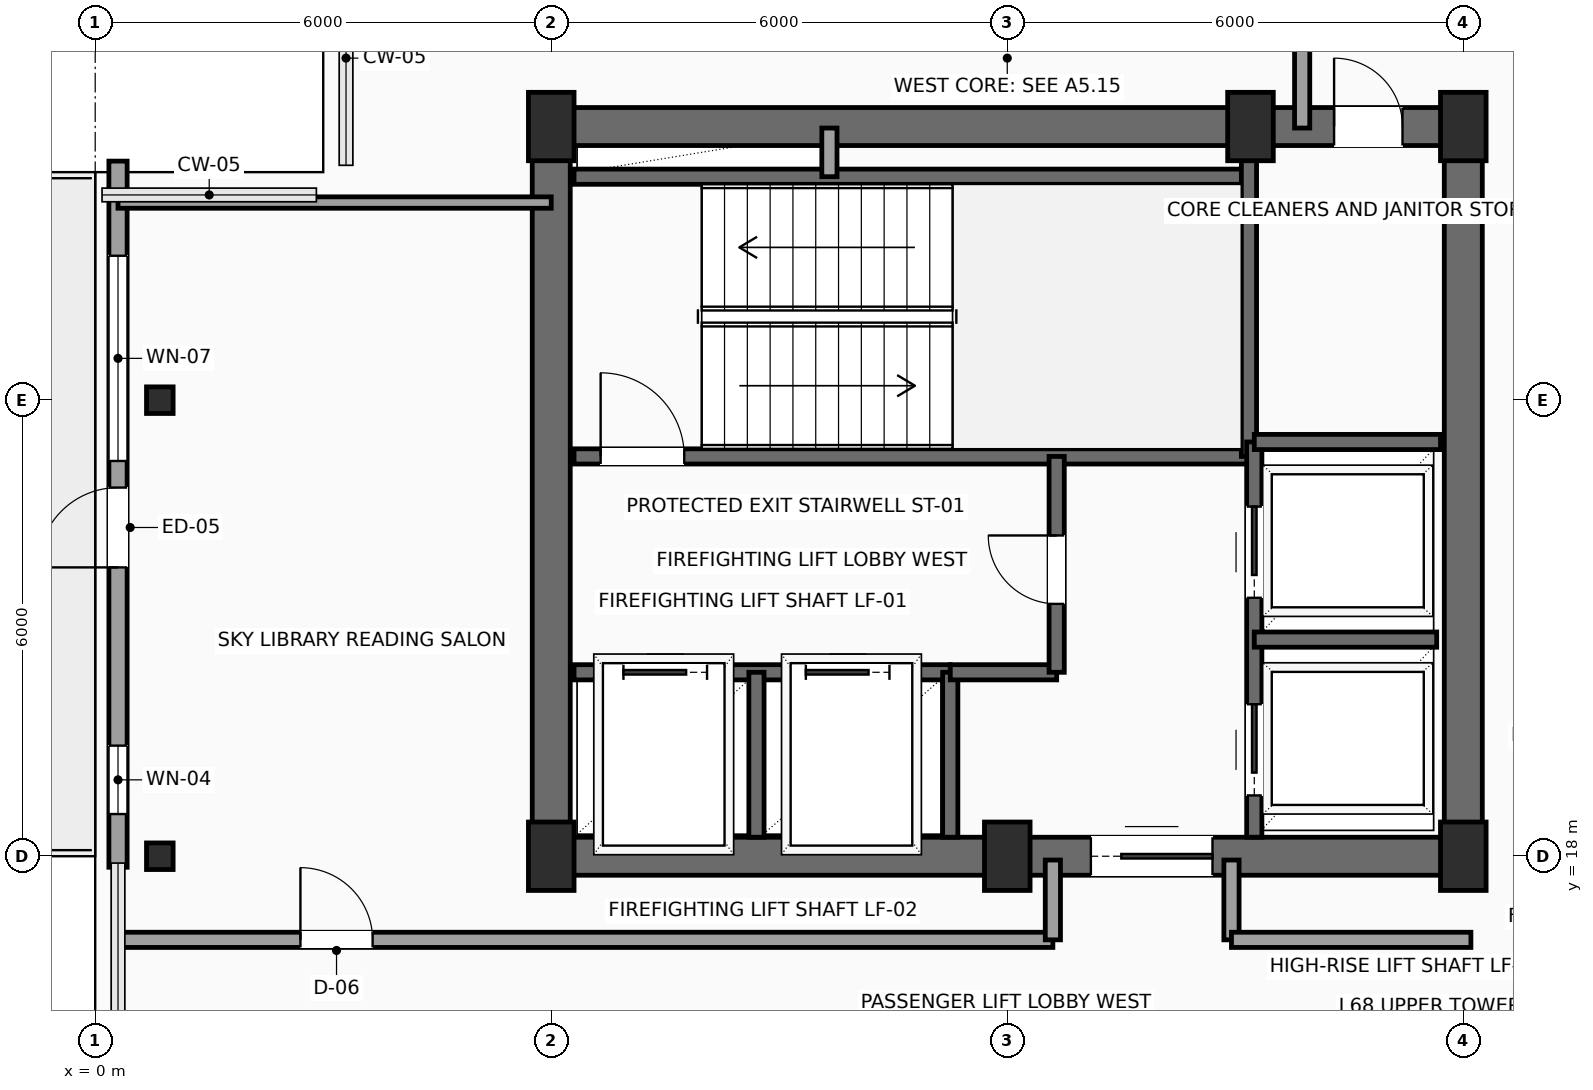
"""IFC4 building model, lengths in metres.
Left out: names, types, materials, properties, quantities, classifications, styles, units other than length and angle.
Written with IfcOpenShell. Run it as: python <this file> out.ifc"""

import sys

from ifc_helpers import new_model, si_unit, direction, frame, frame_2d, origin, origin_2d, place, context, subcontext, project, spatial, rectangle, hollow_rectangle, extrude, element, fill, save


model = new_model("IFC4")
c1 = context("Model", 3, precision=1e-05, world=origin(), true_north=direction((0.0, 1.0)))
c2 = subcontext(c1, "Body", "Model", "MODEL_VIEW")
j1 = project(units=[si_unit("LENGTHUNIT", "METRE"), si_unit("PLANEANGLEUNIT", "RADIAN")], contexts=[c1])
p1 = place(None, origin())
s1 = spatial("IfcSite", under=j1, at=p1, CompositionType="ELEMENT")
p2 = place(p1, origin())
s2 = spatial("IfcBuilding", under=s1, at=p2, CompositionType="ELEMENT")
p3 = place(p2, frame((0.0, 0.0, 271.2)))
s3 = spatial("IfcBuildingStorey", under=s2, at=p3, CompositionType="ELEMENT", Elevation=271.2)
for number, where, z_axis, x_axis in (
    (1, (6.0, 18.0, 0.0), (0.0, 0.0, 1.0), (1.0, 0.0, 0.0)),
    (2, (12.0, 18.0, 0.0), (0.0, 0.0, 1.0), (1.0, 0.0, 0.0)),
    (3, (18.0, 18.0, 0.0), (0.0, 0.0, 1.0), (1.0, 0.0, 0.0)),
    (4, (6.0, 27.6, 0.0), (0.0, 0.0, 1.0), (1.0, 0.0, 0.0)),
    (5, (15.2, 27.6, 0.0), (0.0, 0.0, 1.0), (1.0, 0.0, 0.0)),
    (6, (18.0, 27.6, 0.0), (0.0, 0.0, 1.0), (1.0, 0.0, 0.0)),
):
    element("IfcColumn", number, at=place(p3, frame(where, z_axis=z_axis, x_axis=x_axis)), inside=s3, PredefinedType="COLUMN", context=c2, shape_type="SweptSolid", body=[
        extrude(rectangle(XDim=0.6, YDim=0.9, at=origin_2d()), origin(), (0.0, 0.0, 1.0), 3.5),
    ])
for number, where, z_axis, x_axis in (
    (7, (0.85, 18.0, 0.0), (0.0, 0.0, 1.0), (1.0, 0.0, 0.0)),
    (8, (0.85, 24.0, 0.0), (0.0, 0.0, 1.0), (1.0, 0.0, 0.0)),
):
    element("IfcColumn", number, at=place(p3, frame(where, z_axis=z_axis, x_axis=x_axis)), inside=s3, PredefinedType="COLUMN", context=c2, shape_type="SweptSolid", body=[
        extrude(hollow_rectangle(XDim=0.35, YDim=0.35, WallThickness=0.016, InnerFilletRadius=0.016, OuterFilletRadius=0.032, at=origin_2d()), origin(), (0.0, 0.0, 1.0), 3.5),
    ])
p4 = place(p3, frame((0.3, 17.855, 0.0), z_axis=(0.0, 0.0, 1.0), x_axis=(0.0, 1.0, 0.0)))
e9 = element("IfcWall", 9, at=p4, inside=s3, PredefinedType="SOLIDWALL", context=c2, shape_type="SweptSolid", body=[
    extrude(rectangle(XDim=9.29, YDim=0.24, at=frame_2d((4.645, 0.0))), origin(), (0.0, 0.0, 1.0), 3.3),
])
p5 = place(p4, frame((3.945, 0.0, 0.0)))
e10 = element("IfcOpeningElement", 10, at=p5, cuts=e9, PredefinedType="OPENING", context=c2, shape_type="SweptSolid", body=[
    extrude(rectangle(XDim=1.05, YDim=2.2, at=frame_2d((0.525, 1.1))), frame((0.0, 0.13, 0.0), z_axis=(0.0, -1.0, 0.0), x_axis=(1.0, 0.0, 0.0)), (0.0, 0.0, 1.0), 0.26),
])
p6 = place(p4, frame((5.345, 0.0, 0.6)))
e11 = element("IfcOpeningElement", 11, at=p6, cuts=e9, PredefinedType="OPENING", context=c2, shape_type="SweptSolid", body=[
    extrude(rectangle(XDim=2.7, YDim=2.3, at=frame_2d((1.35, 1.15))), frame((0.0, 0.13, 0.0), z_axis=(0.0, -1.0, 0.0), x_axis=(1.0, 0.0, 0.0)), (0.0, 0.0, 1.0), 0.26),
])
p7 = place(p4, frame((0.7, 0.0, 0.6)))
e12 = element("IfcOpeningElement", 12, at=p7, cuts=e9, PredefinedType="OPENING", context=c2, shape_type="SweptSolid", body=[
    extrude(rectangle(XDim=0.9, YDim=2.2, at=frame_2d((0.45, 1.1))), frame((0.0, 0.13, 0.0), z_axis=(0.0, -1.0, 0.0), x_axis=(1.0, 0.0, 0.0)), (0.0, 0.0, 1.0), 0.26),
])
p8 = place(p3, frame((6.0, 18.0, 0.0), z_axis=(0.0, 0.0, 1.0), x_axis=(1.0, 0.0, 0.0)))
e13 = element("IfcWall", 13, at=p8, inside=s3, PredefinedType="SHEAR", context=c2, shape_type="SweptSolid", body=[
    extrude(rectangle(XDim=12.0, YDim=0.5, at=frame_2d((6.0, 0.0))), origin(), (0.0, 0.0, 1.0), 3.3),
])
p9 = place(p8, frame((7.1, 0.0, 0.0)))
e14 = element("IfcOpeningElement", 14, at=p9, cuts=e13, PredefinedType="OPENING", context=c2, shape_type="SweptSolid", body=[
    extrude(rectangle(XDim=1.6, YDim=2.3, at=frame_2d((0.8, 1.15))), frame((0.0, 0.26, 0.0), z_axis=(0.0, -1.0, 0.0), x_axis=(1.0, 0.0, 0.0)), (0.0, 0.0, 1.0), 0.52),
])
p10 = place(p3, frame((6.0, 27.6, 0.0), z_axis=(0.0, 0.0, 1.0), x_axis=(1.0, 0.0, 0.0)))
e15 = element("IfcWall", 15, at=p10, inside=s3, PredefinedType="SHEAR", context=c2, shape_type="SweptSolid", body=[
    extrude(rectangle(XDim=12.0, YDim=0.5, at=frame_2d((6.0, 0.0))), origin(), (0.0, 0.0, 1.0), 3.3),
])
p11 = place(p10, frame((10.3, 0.0, 0.0)))
e16 = element("IfcOpeningElement", 16, at=p11, cuts=e15, PredefinedType="OPENING", context=c2, shape_type="SweptSolid", body=[
    extrude(rectangle(XDim=0.9, YDim=2.15, at=frame_2d((0.45, 1.075))), frame((0.0, 0.26, 0.0), z_axis=(0.0, -1.0, 0.0), x_axis=(1.0, 0.0, 0.0)), (0.0, 0.0, 1.0), 0.52),
])
for number, where, z_axis, x_axis in (
    (17, (6.0, 18.0, 0.0), (0.0, 0.0, 1.0), (0.0, 1.0, 0.0)),
    (18, (18.0, 18.0, 0.0), (0.0, 0.0, 1.0), (0.0, 1.0, 0.0)),
):
    element("IfcWall", number, at=place(p3, frame(where, z_axis=z_axis, x_axis=x_axis)), inside=s3, PredefinedType="SHEAR", context=c2, shape_type="SweptSolid", body=[
        extrude(rectangle(XDim=9.6, YDim=0.5, at=frame_2d((4.8, 0.0))), origin(), (0.0, 0.0, 1.0), 3.3),
    ])
p12 = place(p3, frame((6.3, 23.26, 0.0), z_axis=(0.0, 0.0, 1.0), x_axis=(1.0, 0.0, 0.0)))
e19 = element("IfcWall", 19, at=p12, inside=s3, PredefinedType="SHEAR", context=c2, shape_type="SweptSolid", body=[
    extrude(rectangle(XDim=8.88, YDim=0.2, at=frame_2d((4.44, 0.0))), origin(), (0.0, 0.0, 1.0), 3.3),
])
p13 = place(p12, frame((0.35, 0.0, 0.0)))
e20 = element("IfcOpeningElement", 20, at=p13, cuts=e19, PredefinedType="OPENING", context=c2, shape_type="SweptSolid", body=[
    extrude(rectangle(XDim=1.1, YDim=2.2, at=frame_2d((0.55, 1.1))), frame((0.0, 0.11, 0.0), z_axis=(0.0, -1.0, 0.0), x_axis=(1.0, 0.0, 0.0)), (0.0, 0.0, 1.0), 0.22),
])
p14 = place(p3, frame((6.3, 26.94, 0.0), z_axis=(0.0, 0.0, 1.0), x_axis=(1.0, 0.0, 0.0)))
e21 = element("IfcWall", 21, at=p14, inside=s3, PredefinedType="SHEAR", context=c2, shape_type="SweptSolid", body=[
    extrude(rectangle(XDim=8.88, YDim=0.2, at=frame_2d((4.44, 0.0))), origin(), (0.0, 0.0, 1.0), 3.3),
])
p15 = place(p3, frame((15.18, 23.26, 0.0), z_axis=(0.0, 0.0, 1.0), x_axis=(0.0, 1.0, 0.0)))
e22 = element("IfcWall", 22, at=p15, inside=s3, PredefinedType="SHEAR", context=c2, shape_type="SweptSolid", body=[
    extrude(rectangle(XDim=4.04, YDim=0.2, at=frame_2d((2.02, 0.0))), origin(), (0.0, 0.0, 1.0), 3.3),
])
p16 = place(p3, frame((6.3, 20.42, 0.0), z_axis=(0.0, 0.0, 1.0), x_axis=(1.0, 0.0, 0.0)))
e23 = element("IfcWall", 23, at=p16, inside=s3, PredefinedType="SHEAR", context=c2, shape_type="SweptSolid", body=[
    extrude(rectangle(XDim=4.95, YDim=0.2, at=frame_2d((2.475, 0.0))), origin(), (0.0, 0.0, 1.0), 3.3),
])
p17 = place(p16, frame((0.65, 0.0, 0.0)))
e24 = element("IfcOpeningElement", 24, at=p17, cuts=e23, PredefinedType="OPENING", context=c2, shape_type="SweptSolid", body=[
    extrude(rectangle(XDim=1.1, YDim=2.2, at=frame_2d((0.55, 1.1))), frame((0.0, 0.11, 0.0), z_axis=(0.0, -1.0, 0.0), x_axis=(1.0, 0.0, 0.0)), (0.0, 0.0, 1.0), 0.22),
])
p18 = place(p16, frame((3.05, 0.0, 0.0)))
e25 = element("IfcOpeningElement", 25, at=p18, cuts=e23, PredefinedType="OPENING", context=c2, shape_type="SweptSolid", body=[
    extrude(rectangle(XDim=1.1, YDim=2.2, at=frame_2d((0.55, 1.1))), frame((0.0, 0.11, 0.0), z_axis=(0.0, -1.0, 0.0), x_axis=(1.0, 0.0, 0.0)), (0.0, 0.0, 1.0), 0.22),
])
for number, where, z_axis, x_axis in (
    (26, (8.7, 18.25, 0.0), (0.0, 0.0, 1.0), (0.0, 1.0, 0.0)),
    (27, (11.25, 18.25, 0.0), (0.0, 0.0, 1.0), (0.0, 1.0, 0.0)),
):
    element("IfcWall", number, at=place(p3, frame(where, z_axis=z_axis, x_axis=x_axis)), inside=s3, PredefinedType="SHEAR", context=c2, shape_type="SweptSolid", body=[
        extrude(rectangle(XDim=2.17, YDim=0.2, at=frame_2d((1.085, 0.0))), origin(), (0.0, 0.0, 1.0), 3.3),
    ])
p19 = place(p3, frame((11.25, 20.42, 0.0), z_axis=(0.0, 0.0, 1.0), x_axis=(1.0, 0.0, 0.0)))
e28 = element("IfcWall", 28, at=p19, inside=s3, PredefinedType="SHEAR", context=c2, shape_type="SweptSolid", body=[
    extrude(rectangle(XDim=1.4, YDim=0.2, at=frame_2d((0.7, 0.0))), origin(), (0.0, 0.0, 1.0), 3.3),
])
p20 = place(p3, frame((12.65, 20.42, 0.0), z_axis=(0.0, 0.0, 1.0), x_axis=(0.0, 1.0, 0.0)))
e29 = element("IfcWall", 29, at=p20, inside=s3, PredefinedType="SHEAR", context=c2, shape_type="SweptSolid", body=[
    extrude(rectangle(XDim=2.84, YDim=0.2, at=frame_2d((1.42, 0.0))), origin(), (0.0, 0.0, 1.0), 3.3),
])
p21 = place(p20, frame((0.9, 0.0, 0.0)))
e30 = element("IfcOpeningElement", 30, at=p21, cuts=e29, PredefinedType="OPENING", context=c2, shape_type="SweptSolid", body=[
    extrude(rectangle(XDim=0.9, YDim=2.15, at=frame_2d((0.45, 1.075))), frame((0.0, 0.11, 0.0), z_axis=(0.0, -1.0, 0.0), x_axis=(1.0, 0.0, 0.0)), (0.0, 0.0, 1.0), 0.22),
])
p22 = place(p3, frame((9.66, 26.94, 0.0), z_axis=(0.0, 0.0, 1.0), x_axis=(0.0, 1.0, 0.0)))
e31 = element("IfcWall", 31, at=p22, inside=s3, PredefinedType="SOLIDWALL", context=c2, shape_type="SweptSolid", body=[
    extrude(rectangle(XDim=0.64, YDim=0.2, at=frame_2d((0.32, 0.0))), origin(), (0.0, 0.0, 1.0), 3.3),
])
p23 = place(p3, frame((15.25, 18.25, 0.0), z_axis=(0.0, 0.0, 1.0), x_axis=(0.0, 1.0, 0.0)))
e32 = element("IfcWall", 32, at=p23, inside=s3, PredefinedType="SHEAR", context=c2, shape_type="SweptSolid", body=[
    extrude(rectangle(XDim=5.2, YDim=0.2, at=frame_2d((2.6, 0.0))), origin(), (0.0, 0.0, 1.0), 3.3),
])
p24 = place(p23, frame((0.55, 0.0, 0.0)))
e33 = element("IfcOpeningElement", 33, at=p24, cuts=e32, PredefinedType="OPENING", context=c2, shape_type="SweptSolid", body=[
    extrude(rectangle(XDim=1.2, YDim=2.2, at=frame_2d((0.6, 1.1))), frame((0.0, 0.11, 0.0), z_axis=(0.0, -1.0, 0.0), x_axis=(1.0, 0.0, 0.0)), (0.0, 0.0, 1.0), 0.22),
])
p25 = place(p23, frame((3.15, 0.0, 0.0)))
e34 = element("IfcOpeningElement", 34, at=p25, cuts=e32, PredefinedType="OPENING", context=c2, shape_type="SweptSolid", body=[
    extrude(rectangle(XDim=1.2, YDim=2.2, at=frame_2d((0.6, 1.1))), frame((0.0, 0.11, 0.0), z_axis=(0.0, -1.0, 0.0), x_axis=(1.0, 0.0, 0.0)), (0.0, 0.0, 1.0), 0.22),
])
p26 = place(p3, frame((15.25, 20.85, 0.0), z_axis=(0.0, 0.0, 1.0), x_axis=(1.0, 0.0, 0.0)))
e35 = element("IfcWall", 35, at=p26, inside=s3, PredefinedType="SHEAR", context=c2, shape_type="SweptSolid", body=[
    extrude(rectangle(XDim=2.4, YDim=0.2, at=frame_2d((1.2, 0.0))), origin(), (0.0, 0.0, 1.0), 3.3),
])
p27 = place(p3, frame((15.25, 23.45, 0.0), z_axis=(0.0, 0.0, 1.0), x_axis=(1.0, 0.0, 0.0)))
e36 = element("IfcWall", 36, at=p27, inside=s3, PredefinedType="SHEAR", context=c2, shape_type="SweptSolid", body=[
    extrude(rectangle(XDim=2.45, YDim=0.2, at=frame_2d((1.225, 0.0))), origin(), (0.0, 0.0, 1.0), 3.3),
])
p28 = place(p3, frame((0.3, 16.9, 0.0), z_axis=(0.0, 0.0, 1.0), x_axis=(1.0, 0.0, 0.0)))
e37 = element("IfcWall", 37, at=p28, inside=s3, PredefinedType="PARTITIONING", context=c2, shape_type="SweptSolid", body=[
    extrude(rectangle(XDim=12.3, YDim=0.2, at=frame_2d((6.15, 0.0))), origin(), (0.0, 0.0, 1.0), 3.3),
])
p29 = place(p28, frame((2.4, 0.0, 0.0)))
e38 = element("IfcOpeningElement", 38, at=p29, cuts=e37, PredefinedType="OPENING", context=c2, shape_type="SweptSolid", body=[
    extrude(rectangle(XDim=0.95, YDim=2.15, at=frame_2d((0.475, 1.075))), frame((0.0, 0.11, 0.0), z_axis=(0.0, -1.0, 0.0), x_axis=(1.0, 0.0, 0.0)), (0.0, 0.0, 1.0), 0.22),
])
for number, where, z_axis, x_axis in (
    (39, (12.6, 16.9, 0.0), (0.0, 0.0, 1.0), (0.0, 1.0, 0.0)),
    (40, (14.95, 17.95, 0.0), (0.0, 0.0, 1.0), (0.0, -1.0, 0.0)),
):
    element("IfcWall", number, at=place(p3, frame(where, z_axis=z_axis, x_axis=x_axis)), inside=s3, PredefinedType="PARTITIONING", context=c2, shape_type="SweptSolid", body=[
        extrude(rectangle(XDim=1.05, YDim=0.2, at=frame_2d((0.525, 0.0))), origin(), (0.0, 0.0, 1.0), 3.3),
    ])
p30 = place(p3, frame((14.95, 16.9, 0.0), z_axis=(0.0, 0.0, 1.0), x_axis=(1.0, 0.0, 0.0)))
e41 = element("IfcWall", 41, at=p30, inside=s3, PredefinedType="PARTITIONING", context=c2, shape_type="SweptSolid", body=[
    extrude(rectangle(XDim=3.15, YDim=0.2, at=frame_2d((1.575, 0.0))), origin(), (0.0, 0.0, 1.0), 3.3),
])
p31 = place(p3, frame((15.88, 27.58, 0.0), z_axis=(0.0, 0.0, 1.0), x_axis=(0.0, 1.0, 0.0)))
e42 = element("IfcWall", 42, at=p31, inside=s3, PredefinedType="PARTITIONING", context=c2, shape_type="SweptSolid", body=[
    extrude(rectangle(XDim=2.12, YDim=0.2, at=frame_2d((1.06, 0.0))), origin(), (0.0, 0.0, 1.0), 3.3),
])
p32 = place(p3, frame((0.3, 26.6, 0.0), z_axis=(0.0, 0.0, 1.0), x_axis=(1.0, 0.0, 0.0)))
e43 = element("IfcWall", 43, at=p32, inside=s3, PredefinedType="PARTITIONING", context=c2, shape_type="SweptSolid", body=[
    extrude(rectangle(XDim=5.7, YDim=0.15, at=frame_2d((2.85, 0.0))), origin(), (0.0, 0.0, 1.0), 3.3),
])
p33 = place(p5, origin())
e44 = element("IfcDoor", 44, at=p33, inside=s3, OperationType="SINGLE_SWING_LEFT", PredefinedType="DOOR", context=c2, shape_type="SweptSolid", body=[
    extrude(rectangle(XDim=1.05, YDim=2.2, at=frame_2d((0.525, 1.1))), frame((0.0, 0.025, 0.0), z_axis=(0.0, -1.0, 0.0), x_axis=(1.0, 0.0, 0.0)), (0.0, 0.0, 1.0), 0.05),
])
fill(e10, e44)
p34 = place(p6, origin())
e45 = element("IfcWindow", 45, at=p34, inside=s3, PartitioningType="SINGLE_PANEL", PredefinedType="WINDOW", context=c2, shape_type="SweptSolid", body=[
    extrude(rectangle(XDim=2.7, YDim=2.3, at=frame_2d((1.35, 1.15))), frame((0.0, 0.03, 0.0), z_axis=(0.0, -1.0, 0.0), x_axis=(1.0, 0.0, 0.0)), (0.0, 0.0, 1.0), 0.06),
])
fill(e11, e45)
p35 = place(p7, origin())
e46 = element("IfcWindow", 46, at=p35, inside=s3, PartitioningType="SINGLE_PANEL", PredefinedType="WINDOW", context=c2, shape_type="SweptSolid", body=[
    extrude(rectangle(XDim=0.9, YDim=2.2, at=frame_2d((0.45, 1.1))), frame((0.0, 0.03, 0.0), z_axis=(0.0, -1.0, 0.0), x_axis=(1.0, 0.0, 0.0)), (0.0, 0.0, 1.0), 0.06),
])
fill(e12, e46)
p36 = place(p9, origin())
e47 = element("IfcDoor", 47, at=p36, inside=s3, OperationType="DOUBLE_DOOR_SLIDING", PredefinedType="DOOR", context=c2, shape_type="SweptSolid", body=[
    extrude(rectangle(XDim=1.6, YDim=2.3, at=frame_2d((0.8, 1.15))), frame((0.0, 0.025, 0.0), z_axis=(0.0, -1.0, 0.0), x_axis=(1.0, 0.0, 0.0)), (0.0, 0.0, 1.0), 0.05),
])
fill(e14, e47)
p37 = place(p11, origin())
e48 = element("IfcDoor", 48, at=p37, inside=s3, OperationType="SINGLE_SWING_LEFT", PredefinedType="DOOR", context=c2, shape_type="SweptSolid", body=[
    extrude(rectangle(XDim=0.9, YDim=2.15, at=frame_2d((0.45, 1.075))), frame((0.0, 0.025, 0.0), z_axis=(0.0, -1.0, 0.0), x_axis=(1.0, 0.0, 0.0)), (0.0, 0.0, 1.0), 0.05),
])
fill(e16, e48)
p38 = place(p13, origin())
e49 = element("IfcDoor", 49, at=p38, inside=s3, OperationType="SINGLE_SWING_LEFT", PredefinedType="DOOR", context=c2, shape_type="SweptSolid", body=[
    extrude(rectangle(XDim=1.1, YDim=2.2, at=frame_2d((0.55, 1.1))), frame((0.0, 0.025, 0.0), z_axis=(0.0, -1.0, 0.0), x_axis=(1.0, 0.0, 0.0)), (0.0, 0.0, 1.0), 0.05),
])
fill(e20, e49)
p39 = place(p17, origin())
e50 = element("IfcDoor", 50, at=p39, inside=s3, OperationType="SLIDING_TO_LEFT", PredefinedType="DOOR", context=c2, shape_type="SweptSolid", body=[
    extrude(rectangle(XDim=1.1, YDim=2.2, at=frame_2d((0.55, 1.1))), frame((0.0, 0.025, 0.0), z_axis=(0.0, -1.0, 0.0), x_axis=(1.0, 0.0, 0.0)), (0.0, 0.0, 1.0), 0.05),
])
fill(e24, e50)
p40 = place(p18, origin())
e51 = element("IfcDoor", 51, at=p40, inside=s3, OperationType="SLIDING_TO_LEFT", PredefinedType="DOOR", context=c2, shape_type="SweptSolid", body=[
    extrude(rectangle(XDim=1.1, YDim=2.2, at=frame_2d((0.55, 1.1))), frame((0.0, 0.025, 0.0), z_axis=(0.0, -1.0, 0.0), x_axis=(1.0, 0.0, 0.0)), (0.0, 0.0, 1.0), 0.05),
])
fill(e25, e51)
p41 = place(p21, origin())
e52 = element("IfcDoor", 52, at=p41, inside=s3, OperationType="SINGLE_SWING_RIGHT", PredefinedType="DOOR", context=c2, shape_type="SweptSolid", body=[
    extrude(rectangle(XDim=0.9, YDim=2.15, at=frame_2d((0.45, 1.075))), frame((0.0, 0.025, 0.0), z_axis=(0.0, -1.0, 0.0), x_axis=(1.0, 0.0, 0.0)), (0.0, 0.0, 1.0), 0.05),
])
fill(e30, e52)
p42 = place(p24, origin())
e53 = element("IfcDoor", 53, at=p42, inside=s3, OperationType="SLIDING_TO_RIGHT", PredefinedType="DOOR", context=c2, shape_type="SweptSolid", body=[
    extrude(rectangle(XDim=1.2, YDim=2.2, at=frame_2d((0.6, 1.1))), frame((0.0, 0.025, 0.0), z_axis=(0.0, -1.0, 0.0), x_axis=(1.0, 0.0, 0.0)), (0.0, 0.0, 1.0), 0.05),
])
fill(e33, e53)
p43 = place(p25, origin())
e54 = element("IfcDoor", 54, at=p43, inside=s3, OperationType="SLIDING_TO_RIGHT", PredefinedType="DOOR", context=c2, shape_type="SweptSolid", body=[
    extrude(rectangle(XDim=1.2, YDim=2.2, at=frame_2d((0.6, 1.1))), frame((0.0, 0.025, 0.0), z_axis=(0.0, -1.0, 0.0), x_axis=(1.0, 0.0, 0.0)), (0.0, 0.0, 1.0), 0.05),
])
fill(e34, e54)
p44 = place(p29, origin())
e55 = element("IfcDoor", 55, at=p44, inside=s3, OperationType="SINGLE_SWING_LEFT", PredefinedType="DOOR", context=c2, shape_type="SweptSolid", body=[
    extrude(rectangle(XDim=0.95, YDim=2.15, at=frame_2d((0.475, 1.075))), frame((0.0, 0.025, 0.0), z_axis=(0.0, -1.0, 0.0), x_axis=(1.0, 0.0, 0.0)), (0.0, 0.0, 1.0), 0.05),
])
fill(e38, e55)
save(model, sys.argv[1])
